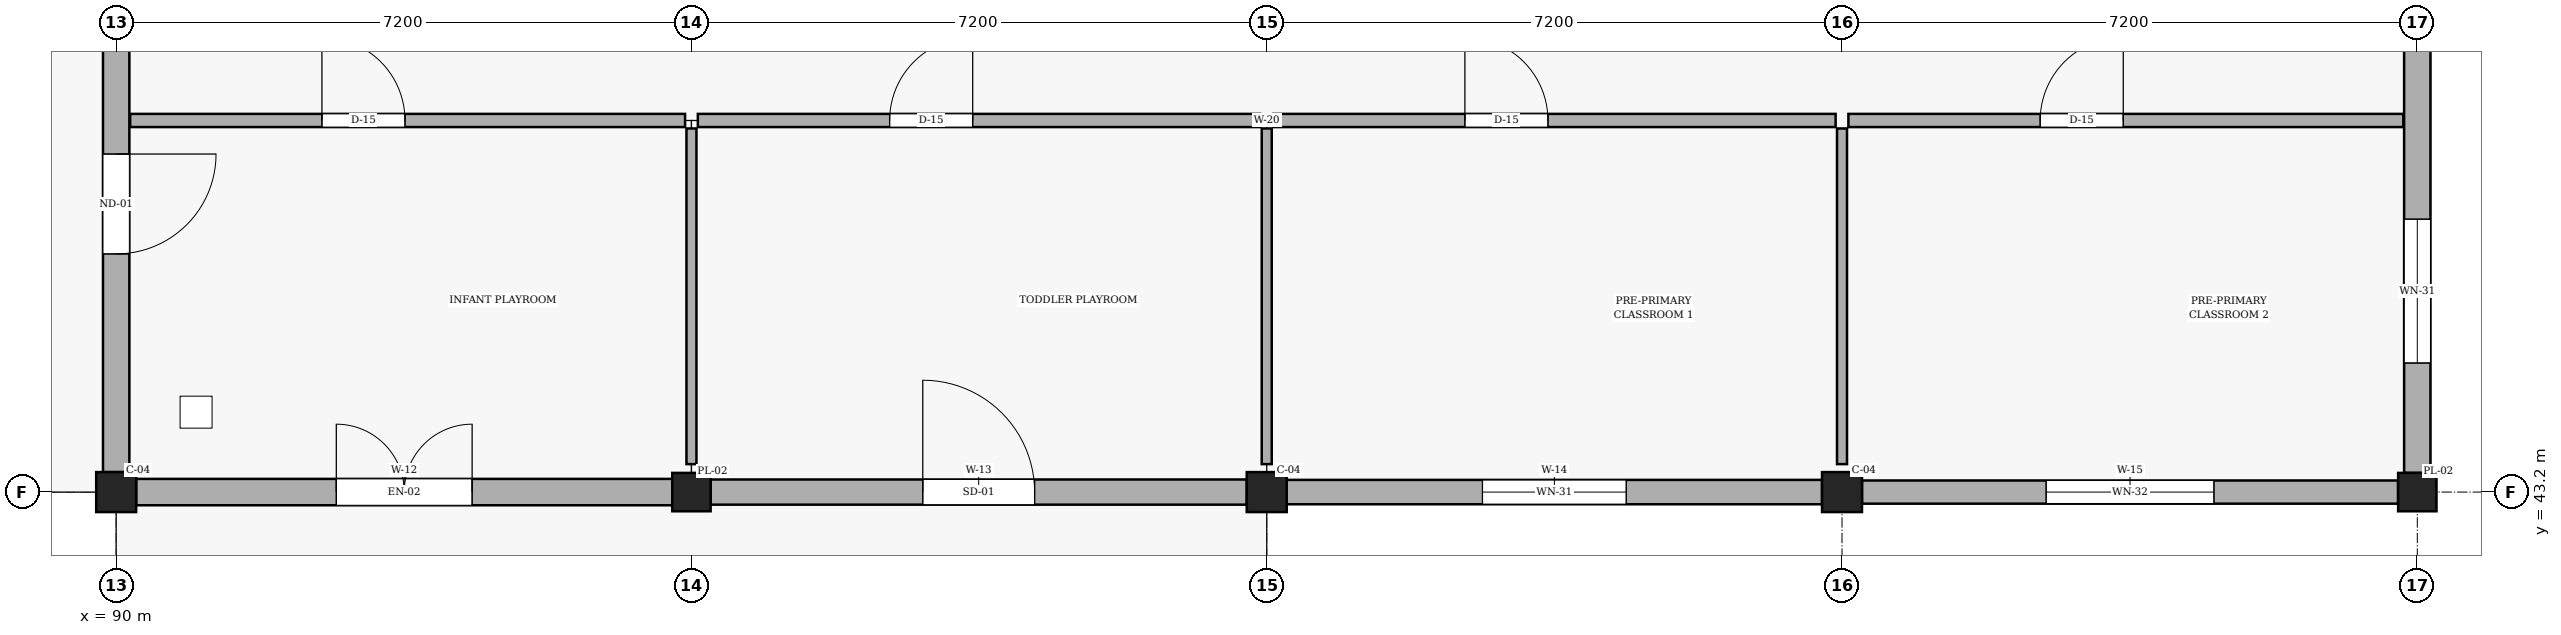
"""IFC4 building model, lengths in metres.
Left out: names, types, materials, properties, quantities, classifications, styles, units other than length and angle.
Written with IfcOpenShell. Run it as: python <this file> out.ifc"""

import sys

from ifc_helpers import new_model, si_unit, direction, frame, frame_2d, origin, origin_2d, place, context, subcontext, project, spatial, rectangle, extrude, element, fill, save


model = new_model("IFC4")
c1 = context("Model", 3, precision=1e-05, world=origin(), true_north=direction((0.0, 1.0)))
c2 = subcontext(c1, "Body", "Model", "MODEL_VIEW")
j1 = project(units=[si_unit("LENGTHUNIT", "METRE"), si_unit("PLANEANGLEUNIT", "RADIAN")], contexts=[c1])
p1 = place(None, origin())
s1 = spatial("IfcSite", under=j1, at=p1, CompositionType="ELEMENT")
p2 = place(p1, origin())
s2 = spatial("IfcBuilding", under=s1, at=p2, CompositionType="ELEMENT")
p3 = place(p2, origin())
s3 = spatial("IfcBuildingStorey", under=s2, at=p3, CompositionType="ELEMENT", Elevation=0.0)
p4 = place(p3, frame((90.0, 43.2, 0.0), z_axis=(0.0, 0.0, 1.0), x_axis=(1.0, 0.0, 0.0)))
e1 = element("IfcColumn", 1, at=p4, inside=s3, PredefinedType="COLUMN", context=c2, shape_type="SweptSolid", body=[
    extrude(rectangle(XDim=0.5, YDim=0.5, at=origin_2d()), origin(), (0.0, 0.0, 1.0), 4.5),
])
p5 = place(p3, frame((97.2, 43.2, 0.0), z_axis=(0.0, 0.0, 1.0), x_axis=(1.0, 0.0, 0.0)))
e2 = element("IfcColumn", 2, at=p5, inside=s3, PredefinedType="PILASTER", context=c2, shape_type="SweptSolid", body=[
    extrude(rectangle(XDim=0.48, YDim=0.48, at=origin_2d()), origin(), (0.0, 0.0, 1.0), 4.5),
])
for number, where, z_axis, x_axis in (
    (3, (104.4, 43.2, 0.0), (0.0, 0.0, 1.0), (1.0, 0.0, 0.0)),
    (4, (111.6, 43.2, 0.0), (0.0, 0.0, 1.0), (1.0, 0.0, 0.0)),
):
    element("IfcColumn", number, at=place(p3, frame(where, z_axis=z_axis, x_axis=x_axis)), inside=s3, PredefinedType="COLUMN", context=c2, shape_type="SweptSolid", body=[
        extrude(rectangle(XDim=0.5, YDim=0.5, at=origin_2d()), origin(), (0.0, 0.0, 1.0), 4.5),
    ])
p6 = place(p3, frame((118.8, 43.2, 0.0), z_axis=(0.0, 0.0, 1.0), x_axis=(1.0, 0.0, 0.0)))
e5 = element("IfcColumn", 5, at=p6, inside=s3, PredefinedType="PILASTER", context=c2, shape_type="SweptSolid", body=[
    extrude(rectangle(XDim=0.48, YDim=0.48, at=origin_2d()), origin(), (0.0, 0.0, 1.0), 4.5),
])
p7 = place(p3, frame((90.25, 43.2, 0.0), z_axis=(0.0, 0.0, 1.0), x_axis=(1.0, 0.0, 0.0)))
e6 = element("IfcWall", 6, at=p7, inside=s3, PredefinedType="SOLIDWALL", context=c2, shape_type="SweptSolid", body=[
    extrude(rectangle(XDim=6.71, YDim=0.33, at=frame_2d((3.355, 0.0))), origin(), (0.0, 0.0, 1.0), 3.83),
])
p8 = place(p7, frame((2.505, 0.0, 0.0)))
e7 = element("IfcOpeningElement", 7, at=p8, cuts=e6, PredefinedType="OPENING", context=c2, shape_type="SweptSolid", body=[
    extrude(rectangle(XDim=1.7, YDim=2.25, at=frame_2d((0.85, 1.125))), frame((0.0, 0.175, 0.0), z_axis=(0.0, -1.0, 0.0), x_axis=(1.0, 0.0, 0.0)), (0.0, 0.0, 1.0), 0.35),
])
p9 = place(p3, frame((97.44, 43.2, 0.0), z_axis=(0.0, 0.0, 1.0), x_axis=(1.0, 0.0, 0.0)))
e8 = element("IfcWall", 8, at=p9, inside=s3, PredefinedType="SOLIDWALL", context=c2, shape_type="SweptSolid", body=[
    extrude(rectangle(XDim=6.71, YDim=0.315, at=frame_2d((3.355, 0.0))), origin(), (0.0, 0.0, 1.0), 3.83),
])
p10 = place(p9, frame((2.655, 0.0, 0.0)))
e9 = element("IfcOpeningElement", 9, at=p10, cuts=e8, PredefinedType="OPENING", context=c2, shape_type="SweptSolid", body=[
    extrude(rectangle(XDim=1.4, YDim=2.2, at=frame_2d((0.7, 1.1))), frame((0.0, 0.167, 0.0), z_axis=(0.0, -1.0, 0.0), x_axis=(1.0, 0.0, 0.0)), (0.0, 0.0, 1.0), 0.335),
])
p11 = place(p3, frame((104.65, 43.2, 0.0), z_axis=(0.0, 0.0, 1.0), x_axis=(1.0, 0.0, 0.0)))
e10 = element("IfcWall", 10, at=p11, inside=s3, PredefinedType="SOLIDWALL", context=c2, shape_type="SweptSolid", body=[
    extrude(rectangle(XDim=6.7, YDim=0.305, at=frame_2d((3.35, 0.0))), origin(), (0.0, 0.0, 1.0), 3.83),
])
p12 = place(p11, frame((2.45, 0.0, 0.85)))
e11 = element("IfcOpeningElement", 11, at=p12, cuts=e10, PredefinedType="OPENING", context=c2, shape_type="SweptSolid", body=[
    extrude(rectangle(XDim=1.8, YDim=2.1, at=frame_2d((0.9, 1.05))), frame((0.0, 0.163, 0.0), z_axis=(0.0, -1.0, 0.0), x_axis=(1.0, 0.0, 0.0)), (0.0, 0.0, 1.0), 0.325),
])
p13 = place(p3, frame((111.85, 43.2, 0.0), z_axis=(0.0, 0.0, 1.0), x_axis=(1.0, 0.0, 0.0)))
e12 = element("IfcWall", 12, at=p13, inside=s3, PredefinedType="SOLIDWALL", context=c2, shape_type="SweptSolid", body=[
    extrude(rectangle(XDim=6.71, YDim=0.29, at=frame_2d((3.355, 0.0))), origin(), (0.0, 0.0, 1.0), 3.83),
])
p14 = place(p13, frame((2.305, 0.0, 0.85)))
e13 = element("IfcOpeningElement", 13, at=p14, cuts=e12, PredefinedType="OPENING", context=c2, shape_type="SweptSolid", body=[
    extrude(rectangle(XDim=2.1, YDim=2.1, at=frame_2d((1.05, 1.05))), frame((0.0, 0.155, 0.0), z_axis=(0.0, -1.0, 0.0), x_axis=(1.0, 0.0, 0.0)), (0.0, 0.0, 1.0), 0.31),
])
p15 = place(p3, frame((118.8, 43.44, 0.0), z_axis=(0.0, 0.0, 1.0), x_axis=(0.0, 1.0, 0.0)))
e14 = element("IfcWall", 14, at=p15, inside=s3, PredefinedType="SOLIDWALL", context=c2, shape_type="SweptSolid", body=[
    extrude(rectangle(XDim=6.71, YDim=0.33, at=frame_2d((3.355, 0.0))), origin(), (0.0, 0.0, 1.0), 3.83),
])
p16 = place(p15, frame((1.375, 0.0, 0.85)))
e15 = element("IfcOpeningElement", 15, at=p16, cuts=e14, PredefinedType="OPENING", context=c2, shape_type="SweptSolid", body=[
    extrude(rectangle(XDim=1.8, YDim=2.1, at=frame_2d((0.9, 1.05))), frame((0.0, 0.175, 0.0), z_axis=(0.0, -1.0, 0.0), x_axis=(1.0, 0.0, 0.0)), (0.0, 0.0, 1.0), 0.35),
])
p17 = place(p3, frame((90.0, 50.16, 0.0), z_axis=(0.0, 0.0, 1.0), x_axis=(0.0, -1.0, 0.0)))
e16 = element("IfcWall", 16, at=p17, inside=s3, PredefinedType="SOLIDWALL", context=c2, shape_type="SweptSolid", body=[
    extrude(rectangle(XDim=6.71, YDim=0.33, at=frame_2d((3.355, 0.0))), origin(), (0.0, 0.0, 1.0), 3.83),
])
p18 = place(p17, frame((2.73, 0.0, 0.0)))
e17 = element("IfcOpeningElement", 17, at=p18, cuts=e16, PredefinedType="OPENING", context=c2, shape_type="SweptSolid", body=[
    extrude(rectangle(XDim=1.25, YDim=2.15, at=frame_2d((0.625, 1.075))), frame((0.0, 0.175, 0.0), z_axis=(0.0, -1.0, 0.0), x_axis=(1.0, 0.0, 0.0)), (0.0, 0.0, 1.0), 0.35),
])
p19 = place(p3, frame((90.175, 47.85, 0.0), z_axis=(0.0, 0.0, 1.0), x_axis=(1.0, 0.0, 0.0)))
e18 = element("IfcWall", 18, at=p19, inside=s3, PredefinedType="PARTITIONING", context=c2, shape_type="SweptSolid", body=[
    extrude(rectangle(XDim=6.945, YDim=0.165, at=frame_2d((3.473, 0.0))), origin(), (0.0, 0.0, 1.0), 3.41),
])
p20 = place(p19, frame((2.4, 0.0, 0.0)))
e19 = element("IfcOpeningElement", 19, at=p20, cuts=e18, PredefinedType="OPENING", context=c2, shape_type="SweptSolid", body=[
    extrude(rectangle(XDim=1.04, YDim=2.12, at=frame_2d((0.52, 1.06))), frame((0.0, 0.093, 0.0), z_axis=(0.0, -1.0, 0.0), x_axis=(1.0, 0.0, 0.0)), (0.0, 0.0, 1.0), 0.185),
])
p21 = place(p3, frame((97.28, 47.85, 0.0), z_axis=(0.0, 0.0, 1.0), x_axis=(1.0, 0.0, 0.0)))
e20 = element("IfcWall", 20, at=p21, inside=s3, PredefinedType="PARTITIONING", context=c2, shape_type="SweptSolid", body=[
    extrude(rectangle(XDim=7.04, YDim=0.165, at=frame_2d((3.52, 0.0))), origin(), (0.0, 0.0, 1.0), 3.41),
])
p22 = place(p21, frame((2.4, 0.0, 0.0)))
e21 = element("IfcOpeningElement", 21, at=p22, cuts=e20, PredefinedType="OPENING", context=c2, shape_type="SweptSolid", body=[
    extrude(rectangle(XDim=1.04, YDim=2.12, at=frame_2d((0.52, 1.06))), frame((0.0, 0.093, 0.0), z_axis=(0.0, -1.0, 0.0), x_axis=(1.0, 0.0, 0.0)), (0.0, 0.0, 1.0), 0.185),
])
p23 = place(p3, frame((104.48, 47.85, 0.0), z_axis=(0.0, 0.0, 1.0), x_axis=(1.0, 0.0, 0.0)))
e22 = element("IfcWall", 22, at=p23, inside=s3, PredefinedType="PARTITIONING", context=c2, shape_type="SweptSolid", body=[
    extrude(rectangle(XDim=7.04, YDim=0.165, at=frame_2d((3.52, 0.0))), origin(), (0.0, 0.0, 1.0), 3.41),
])
p24 = place(p23, frame((2.4, 0.0, 0.0)))
e23 = element("IfcOpeningElement", 23, at=p24, cuts=e22, PredefinedType="OPENING", context=c2, shape_type="SweptSolid", body=[
    extrude(rectangle(XDim=1.04, YDim=2.12, at=frame_2d((0.52, 1.06))), frame((0.0, 0.093, 0.0), z_axis=(0.0, -1.0, 0.0), x_axis=(1.0, 0.0, 0.0)), (0.0, 0.0, 1.0), 0.185),
])
p25 = place(p3, frame((111.68, 47.85, 0.0), z_axis=(0.0, 0.0, 1.0), x_axis=(1.0, 0.0, 0.0)))
e24 = element("IfcWall", 24, at=p25, inside=s3, PredefinedType="PARTITIONING", context=c2, shape_type="SweptSolid", body=[
    extrude(rectangle(XDim=6.945, YDim=0.165, at=frame_2d((3.473, 0.0))), origin(), (0.0, 0.0, 1.0), 3.41),
])
p26 = place(p25, frame((2.4, 0.0, 0.0)))
e25 = element("IfcOpeningElement", 25, at=p26, cuts=e24, PredefinedType="OPENING", context=c2, shape_type="SweptSolid", body=[
    extrude(rectangle(XDim=1.04, YDim=2.12, at=frame_2d((0.52, 1.06))), frame((0.0, 0.093, 0.0), z_axis=(0.0, -1.0, 0.0), x_axis=(1.0, 0.0, 0.0)), (0.0, 0.0, 1.0), 0.185),
])
for number, where, z_axis, x_axis in (
    (26, (97.2, 43.55, 0.0), (0.0, 0.0, 1.0), (0.0, 1.0, 0.0)),
    (27, (104.4, 43.55, 0.0), (0.0, 0.0, 1.0), (0.0, 1.0, 0.0)),
    (28, (111.6, 43.55, 0.0), (0.0, 0.0, 1.0), (0.0, 1.0, 0.0)),
):
    element("IfcWall", number, at=place(p3, frame(where, z_axis=z_axis, x_axis=x_axis)), inside=s3, PredefinedType="PARTITIONING", context=c2, shape_type="SweptSolid", body=[
        extrude(rectangle(XDim=4.2, YDim=0.125, at=frame_2d((2.1, 0.0))), origin(), (0.0, 0.0, 1.0), 3.41),
    ])
p27 = place(p8, frame((1.7, 0.0, 0.0), z_axis=(0.0, 0.0, 1.0), x_axis=(-1.0, 0.0, 0.0)))
e29 = element("IfcDoor", 29, at=p27, inside=s3, OperationType="DOUBLE_DOOR_SINGLE_SWING", PredefinedType="DOOR", context=c2, shape_type="SweptSolid", body=[
    extrude(rectangle(XDim=1.7, YDim=2.25, at=frame_2d((0.85, 1.125))), frame((0.0, 0.025, 0.0), z_axis=(0.0, -1.0, 0.0), x_axis=(1.0, 0.0, 0.0)), (0.0, 0.0, 1.0), 0.05),
])
fill(e7, e29)
p28 = place(p10, frame((1.4, 0.0, 0.0), z_axis=(0.0, 0.0, 1.0), x_axis=(-1.0, 0.0, 0.0)))
e30 = element("IfcDoor", 30, at=p28, inside=s3, OperationType="SINGLE_SWING_LEFT", PredefinedType="DOOR", context=c2, shape_type="SweptSolid", body=[
    extrude(rectangle(XDim=1.4, YDim=2.2, at=frame_2d((0.7, 1.1))), frame((0.0, 0.025, 0.0), z_axis=(0.0, -1.0, 0.0), x_axis=(1.0, 0.0, 0.0)), (0.0, 0.0, 1.0), 0.05),
])
fill(e9, e30)
p29 = place(p12, origin())
e31 = element("IfcWindow", 31, at=p29, inside=s3, PartitioningType="SINGLE_PANEL", PredefinedType="WINDOW", context=c2, shape_type="SweptSolid", body=[
    extrude(rectangle(XDim=1.8, YDim=2.1, at=frame_2d((0.9, 1.05))), frame((0.0, 0.03, 0.0), z_axis=(0.0, -1.0, 0.0), x_axis=(1.0, 0.0, 0.0)), (0.0, 0.0, 1.0), 0.06),
])
fill(e11, e31)
p30 = place(p14, origin())
e32 = element("IfcWindow", 32, at=p30, inside=s3, PartitioningType="SINGLE_PANEL", PredefinedType="WINDOW", context=c2, shape_type="SweptSolid", body=[
    extrude(rectangle(XDim=2.1, YDim=2.1, at=frame_2d((1.05, 1.05))), frame((0.0, 0.03, 0.0), z_axis=(0.0, -1.0, 0.0), x_axis=(1.0, 0.0, 0.0)), (0.0, 0.0, 1.0), 0.06),
])
fill(e13, e32)
p31 = place(p16, origin())
e33 = element("IfcWindow", 33, at=p31, inside=s3, PartitioningType="SINGLE_PANEL", PredefinedType="WINDOW", context=c2, shape_type="SweptSolid", body=[
    extrude(rectangle(XDim=1.8, YDim=2.1, at=frame_2d((0.9, 1.05))), frame((0.0, 0.03, 0.0), z_axis=(0.0, -1.0, 0.0), x_axis=(1.0, 0.0, 0.0)), (0.0, 0.0, 1.0), 0.06),
])
fill(e15, e33)
p32 = place(p18, frame((1.25, 0.0, 0.0), z_axis=(0.0, 0.0, 1.0), x_axis=(-1.0, 0.0, 0.0)))
e34 = element("IfcDoor", 34, at=p32, inside=s3, OperationType="SINGLE_SWING_LEFT", PredefinedType="DOOR", context=c2, shape_type="SweptSolid", body=[
    extrude(rectangle(XDim=1.25, YDim=2.15, at=frame_2d((0.625, 1.075))), frame((0.0, 0.025, 0.0), z_axis=(0.0, -1.0, 0.0), x_axis=(1.0, 0.0, 0.0)), (0.0, 0.0, 1.0), 0.05),
])
fill(e17, e34)
p33 = place(p20, origin())
e35 = element("IfcDoor", 35, at=p33, inside=s3, OperationType="SINGLE_SWING_LEFT", PredefinedType="DOOR", context=c2, shape_type="SweptSolid", body=[
    extrude(rectangle(XDim=1.04, YDim=2.12, at=frame_2d((0.52, 1.06))), frame((0.0, 0.025, 0.0), z_axis=(0.0, -1.0, 0.0), x_axis=(1.0, 0.0, 0.0)), (0.0, 0.0, 1.0), 0.05),
])
fill(e19, e35)
p34 = place(p22, origin())
e36 = element("IfcDoor", 36, at=p34, inside=s3, OperationType="SINGLE_SWING_RIGHT", PredefinedType="DOOR", context=c2, shape_type="SweptSolid", body=[
    extrude(rectangle(XDim=1.04, YDim=2.12, at=frame_2d((0.52, 1.06))), frame((0.0, 0.025, 0.0), z_axis=(0.0, -1.0, 0.0), x_axis=(1.0, 0.0, 0.0)), (0.0, 0.0, 1.0), 0.05),
])
fill(e21, e36)
p35 = place(p24, origin())
e37 = element("IfcDoor", 37, at=p35, inside=s3, OperationType="SINGLE_SWING_LEFT", PredefinedType="DOOR", context=c2, shape_type="SweptSolid", body=[
    extrude(rectangle(XDim=1.04, YDim=2.12, at=frame_2d((0.52, 1.06))), frame((0.0, 0.025, 0.0), z_axis=(0.0, -1.0, 0.0), x_axis=(1.0, 0.0, 0.0)), (0.0, 0.0, 1.0), 0.05),
])
fill(e23, e37)
p36 = place(p26, origin())
e38 = element("IfcDoor", 38, at=p36, inside=s3, OperationType="SINGLE_SWING_RIGHT", PredefinedType="DOOR", context=c2, shape_type="SweptSolid", body=[
    extrude(rectangle(XDim=1.04, YDim=2.12, at=frame_2d((0.52, 1.06))), frame((0.0, 0.025, 0.0), z_axis=(0.0, -1.0, 0.0), x_axis=(1.0, 0.0, 0.0)), (0.0, 0.0, 1.0), 0.05),
])
fill(e25, e38)
save(model, sys.argv[1])
